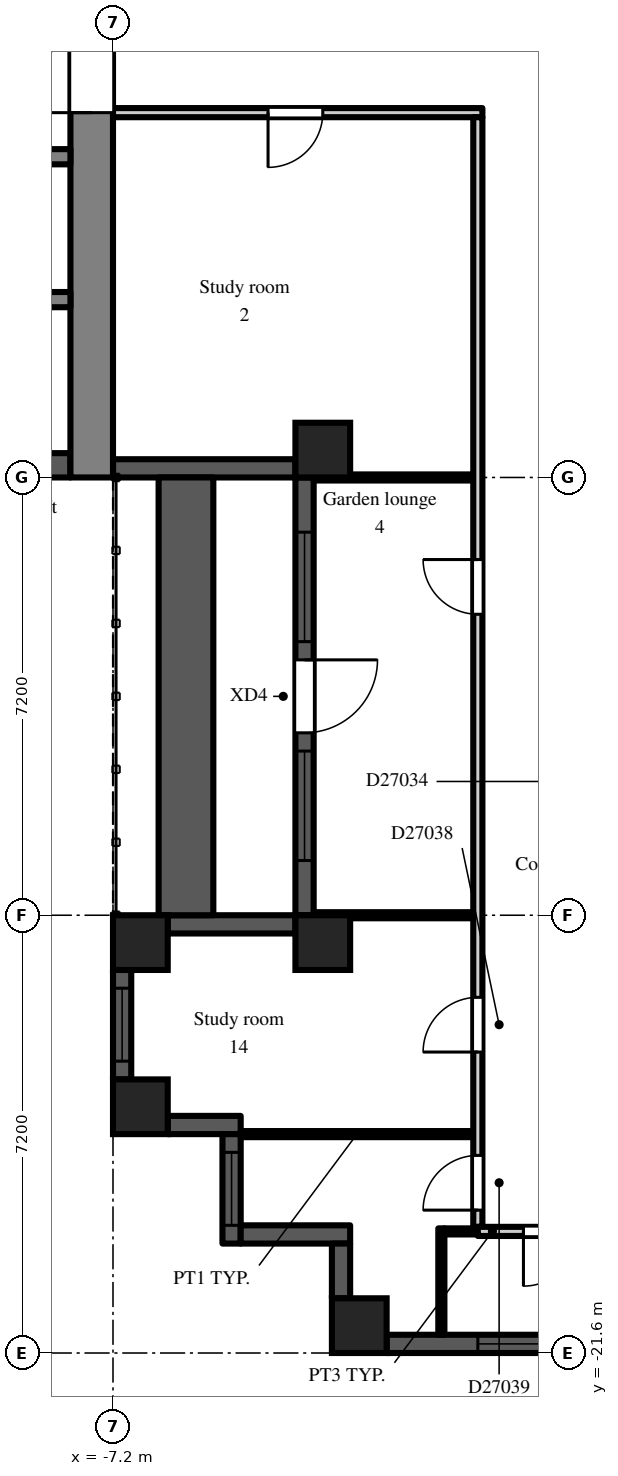
"""IFC4 building model, lengths in metres.
Left out: names, types, materials, properties, quantities, classifications, styles, units other than length and angle.
Written with IfcOpenShell. Run it as: python <this file> out.ifc"""

import sys

from ifc_helpers import new_model, si_unit, direction, frame, frame_2d, origin, origin_2d, place, context, subcontext, project, spatial, rectangle, extrude, element, fill, save


model = new_model("IFC4")
c1 = context("Model", 3, precision=1e-05, world=origin(), true_north=direction((0.0, 1.0)))
c2 = subcontext(c1, "Body", "Model", "MODEL_VIEW")
j1 = project(units=[si_unit("LENGTHUNIT", "METRE"), si_unit("PLANEANGLEUNIT", "RADIAN")], contexts=[c1])
p1 = place(None, origin())
s1 = spatial("IfcSite", under=j1, at=p1, CompositionType="ELEMENT")
p2 = place(p1, origin())
s2 = spatial("IfcBuilding", under=s1, at=p2, CompositionType="ELEMENT")
p3 = place(p2, frame((0.0, 0.0, 191.7)))
s3 = spatial("IfcBuildingStorey", under=s2, at=p3, CompositionType="ELEMENT", Elevation=191.7)
for number, where, z_axis, x_axis in (
    (1, (-6.75, -17.55, 0.0), (0.0, 0.0, 1.0), (1.0, 0.0, 0.0)),
    (2, (-6.75, -14.85, 0.0), (0.0, 0.0, 1.0), (1.0, 0.0, 0.0)),
    (3, (-3.75, -14.85, 0.0), (0.0, 0.0, 1.0), (1.0, 0.0, 0.0)),
    (4, (-3.75, -6.75, 0.0), (0.0, 0.0, 1.0), (1.0, 0.0, 0.0)),
    (5, (-3.15, -21.15, 0.0), (0.0, 0.0, 1.0), (1.0, 0.0, 0.0)),
):
    element("IfcColumn", number, at=place(p3, frame(where, z_axis=z_axis, x_axis=x_axis)), inside=s3, PredefinedType="COLUMN", context=c2, shape_type="SweptSolid", body=[
        extrude(rectangle(XDim=0.9, YDim=0.9, at=origin_2d()), origin(), (0.0, 0.0, 1.0), 3.0),
    ])
p4 = place(p3, frame((-7.2, -7.05, 0.0), z_axis=(0.0, 0.0, 1.0), x_axis=(1.0, 0.0, 0.0)))
e6 = element("IfcWall", 6, at=p4, inside=s3, PredefinedType="SOLIDWALL", context=c2, shape_type="SweptSolid", body=[
    extrude(rectangle(XDim=3.0, YDim=0.3, at=frame_2d((1.5, 0.0))), origin(), (0.0, 0.0, 1.0), 2.55),
])
p5 = place(p3, frame((-4.05, -7.2, 0.0), z_axis=(0.0, 0.0, 1.0), x_axis=(0.0, -1.0, 0.0)))
e7 = element("IfcWall", 7, at=p5, inside=s3, PredefinedType="SOLIDWALL", context=c2, shape_type="SweptSolid", body=[
    extrude(rectangle(XDim=7.2, YDim=0.3, at=frame_2d((3.6, 0.0))), origin(), (0.0, 0.0, 1.0), 2.55),
])
p6 = place(p5, frame((3.0, 0.0, 0.0)))
e8 = element("IfcOpeningElement", 8, at=p6, cuts=e7, PredefinedType="OPENING", context=c2, shape_type="SweptSolid", body=[
    extrude(rectangle(XDim=1.2, YDim=2.05, at=frame_2d((0.6, 1.025))), frame((0.0, 0.16, 0.0), z_axis=(0.0, -1.0, 0.0), x_axis=(1.0, 0.0, 0.0)), (0.0, 0.0, 1.0), 0.32),
])
p7 = place(p5, frame((0.9, 0.0, 0.2)))
e9 = element("IfcOpeningElement", 9, at=p7, cuts=e7, PredefinedType="OPENING", context=c2, shape_type="SweptSolid", body=[
    extrude(rectangle(XDim=1.8, YDim=1.85, at=frame_2d((0.9, 0.925))), frame((0.0, 0.16, 0.0), z_axis=(0.0, -1.0, 0.0), x_axis=(1.0, 0.0, 0.0)), (0.0, 0.0, 1.0), 0.32),
])
p8 = place(p5, frame((4.5, 0.0, 0.2)))
e10 = element("IfcOpeningElement", 10, at=p8, cuts=e7, PredefinedType="OPENING", context=c2, shape_type="SweptSolid", body=[
    extrude(rectangle(XDim=1.8, YDim=1.85, at=frame_2d((0.9, 0.925))), frame((0.0, 0.16, 0.0), z_axis=(0.0, -1.0, 0.0), x_axis=(1.0, 0.0, 0.0)), (0.0, 0.0, 1.0), 0.32),
])
p9 = place(p3, frame((-4.2, -14.55, 0.0), z_axis=(0.0, 0.0, 1.0), x_axis=(-1.0, 0.0, 0.0)))
e11 = element("IfcWall", 11, at=p9, inside=s3, PredefinedType="SOLIDWALL", context=c2, shape_type="SweptSolid", body=[
    extrude(rectangle(XDim=2.1, YDim=0.3, at=frame_2d((1.05, 0.0))), origin(), (0.0, 0.0, 1.0), 2.55),
])
p10 = place(p3, frame((-7.05, -15.3, 0.0), z_axis=(0.0, 0.0, 1.0), x_axis=(0.0, -1.0, 0.0)))
e12 = element("IfcWall", 12, at=p10, inside=s3, PredefinedType="SOLIDWALL", context=c2, shape_type="SweptSolid", body=[
    extrude(rectangle(XDim=1.8, YDim=0.3, at=frame_2d((0.9, 0.0))), origin(), (0.0, 0.0, 1.0), 2.3),
])
p11 = place(p10, frame((0.3, 0.0, 0.2)))
e13 = element("IfcOpeningElement", 13, at=p11, cuts=e12, PredefinedType="OPENING", context=c2, shape_type="SweptSolid", body=[
    extrude(rectangle(XDim=1.2, YDim=1.85, at=frame_2d((0.6, 0.925))), frame((0.0, 0.16, 0.0), z_axis=(0.0, -1.0, 0.0), x_axis=(1.0, 0.0, 0.0)), (0.0, 0.0, 1.0), 0.32),
])
p12 = place(p3, frame((-6.3, -17.85, 0.0), z_axis=(0.0, 0.0, 1.0), x_axis=(1.0, 0.0, 0.0)))
e14 = element("IfcWall", 14, at=p12, inside=s3, PredefinedType="SOLIDWALL", context=c2, shape_type="SweptSolid", body=[
    extrude(rectangle(XDim=1.2, YDim=0.3, at=frame_2d((0.6, 0.0))), origin(), (0.0, 0.0, 1.0), 2.55),
])
p13 = place(p3, frame((-5.25, -18.0, 0.0), z_axis=(0.0, 0.0, 1.0), x_axis=(0.0, -1.0, 0.0)))
e15 = element("IfcWall", 15, at=p13, inside=s3, PredefinedType="SOLIDWALL", context=c2, shape_type="SweptSolid", body=[
    extrude(rectangle(XDim=1.8, YDim=0.3, at=frame_2d((0.9, 0.0))), origin(), (0.0, 0.0, 1.0), 2.55),
])
p14 = place(p13, frame((0.3, 0.0, 0.2)))
e16 = element("IfcOpeningElement", 16, at=p14, cuts=e15, PredefinedType="OPENING", context=c2, shape_type="SweptSolid", body=[
    extrude(rectangle(XDim=1.2, YDim=1.85, at=frame_2d((0.6, 0.925))), frame((0.0, 0.16, 0.0), z_axis=(0.0, -1.0, 0.0), x_axis=(1.0, 0.0, 0.0)), (0.0, 0.0, 1.0), 0.32),
])
p15 = place(p3, frame((-5.1, -19.65, 0.0), z_axis=(0.0, 0.0, 1.0), x_axis=(1.0, 0.0, 0.0)))
e17 = element("IfcWall", 17, at=p15, inside=s3, PredefinedType="SOLIDWALL", context=c2, shape_type="SweptSolid", body=[
    extrude(rectangle(XDim=1.8, YDim=0.3, at=frame_2d((0.9, 0.0))), origin(), (0.0, 0.0, 1.0), 2.55),
])
p16 = place(p3, frame((-3.45, -19.8, 0.0), z_axis=(0.0, 0.0, 1.0), x_axis=(0.0, -1.0, 0.0)))
e18 = element("IfcWall", 18, at=p16, inside=s3, PredefinedType="SOLIDWALL", context=c2, shape_type="SweptSolid", body=[
    extrude(rectangle(XDim=0.9, YDim=0.3, at=frame_2d((0.45, 0.0))), origin(), (0.0, 0.0, 1.0), 2.55),
])
p17 = place(p3, frame((-2.7, -21.45, 0.0), z_axis=(0.0, 0.0, 1.0), x_axis=(1.0, 0.0, 0.0)))
e19 = element("IfcWall", 19, at=p17, inside=s3, PredefinedType="SOLIDWALL", context=c2, shape_type="SweptSolid", body=[
    extrude(rectangle(XDim=5.4, YDim=0.3, at=frame_2d((2.7, 0.0))), origin(), (0.0, 0.0, 1.0), 2.3),
])
p18 = place(p17, frame((1.5, 0.0, 0.2)))
e20 = element("IfcOpeningElement", 20, at=p18, cuts=e19, PredefinedType="OPENING", context=c2, shape_type="SweptSolid", body=[
    extrude(rectangle(XDim=2.4, YDim=1.85, at=frame_2d((1.2, 0.925))), frame((0.0, 0.16, 0.0), z_axis=(0.0, -1.0, 0.0), x_axis=(1.0, 0.0, 0.0)), (0.0, 0.0, 1.0), 0.32),
])
p19 = place(p3, frame((-6.0, -14.4, 0.0), z_axis=(0.0, 0.0, 1.0), x_axis=(0.0, 1.0, 0.0)))
e21 = element("IfcWall", 21, at=p19, inside=s3, PredefinedType="PARAPET", context=c2, shape_type="SweptSolid", body=[
    extrude(rectangle(XDim=7.2, YDim=0.9, at=frame_2d((3.6, 0.0))), origin(), (0.0, 0.0, 1.0), 0.8),
])
p20 = place(p3, frame((-7.55, -7.2, 0.0), z_axis=(0.0, 0.0, 1.0), x_axis=(0.0, 1.0, 0.0)))
e22 = element("IfcWall", 22, at=p20, inside=s3, PredefinedType="SHEAR", context=c2, shape_type="SweptSolid", body=[
    extrude(rectangle(XDim=14.4, YDim=0.7, at=frame_2d((7.2, 0.0))), origin(), (0.0, 0.0, 1.0), 2.55),
])
p21 = place(p20, frame((6.0, 0.0, 0.0)))
e23 = element("IfcOpeningElement", 23, at=p21, cuts=e22, PredefinedType="OPENING", context=c2, shape_type="SweptSolid", body=[
    extrude(rectangle(XDim=2.4, YDim=2.2, at=frame_2d((1.2, 1.1))), frame((0.0, 0.36, 0.0), z_axis=(0.0, -1.0, 0.0), x_axis=(1.0, 0.0, 0.0)), (0.0, 0.0, 1.0), 0.72),
])
p22 = place(p3, frame((-7.9, -7.0, 0.0), z_axis=(0.0, 0.0, 1.0), x_axis=(-1.0, 0.0, 0.0)))
e24 = element("IfcWall", 24, at=p22, inside=s3, PredefinedType="SHEAR", context=c2, shape_type="SweptSolid", body=[
    extrude(rectangle(XDim=12.95, YDim=0.4, at=frame_2d((6.475, 0.0))), origin(), (0.0, 0.0, 1.0), 2.55),
])
p23 = place(p3, frame((-7.9, -1.925, 0.0), z_axis=(0.0, 0.0, 1.0), x_axis=(-1.0, 0.0, 0.0)))
e25 = element("IfcWall", 25, at=p23, inside=s3, PredefinedType="SHEAR", context=c2, shape_type="SweptSolid", body=[
    extrude(rectangle(XDim=12.95, YDim=0.25, at=frame_2d((6.475, 0.0))), origin(), (0.0, 0.0, 1.0), 2.55),
])
p24 = place(p23, frame((0.525, 0.0, 0.0)))
e26 = element("IfcOpeningElement", 26, at=p24, cuts=e25, PredefinedType="OPENING", context=c2, shape_type="SweptSolid", body=[
    extrude(rectangle(XDim=0.9, YDim=2.1, at=frame_2d((0.45, 1.05))), frame((0.0, 0.135, 0.0), z_axis=(0.0, -1.0, 0.0), x_axis=(1.0, 0.0, 0.0)), (0.0, 0.0, 1.0), 0.27),
])
p25 = place(p23, frame((2.625, 0.0, 0.0)))
e27 = element("IfcOpeningElement", 27, at=p25, cuts=e25, PredefinedType="OPENING", context=c2, shape_type="SweptSolid", body=[
    extrude(rectangle(XDim=1.1, YDim=2.1, at=frame_2d((0.55, 1.05))), frame((0.0, 0.135, 0.0), z_axis=(0.0, -1.0, 0.0), x_axis=(1.0, 0.0, 0.0)), (0.0, 0.0, 1.0), 0.27),
])
p26 = place(p23, frame((8.225, 0.0, 0.0)))
e28 = element("IfcOpeningElement", 28, at=p26, cuts=e25, PredefinedType="OPENING", context=c2, shape_type="SweptSolid", body=[
    extrude(rectangle(XDim=0.9, YDim=2.1, at=frame_2d((0.45, 1.05))), frame((0.0, 0.135, 0.0), z_axis=(0.0, -1.0, 0.0), x_axis=(1.0, 0.0, 0.0)), (0.0, 0.0, 1.0), 0.27),
])
p27 = place(p3, frame((-7.9, -4.275, 0.0), z_axis=(0.0, 0.0, 1.0), x_axis=(-1.0, 0.0, 0.0)))
e29 = element("IfcWall", 29, at=p27, inside=s3, PredefinedType="SHEAR", context=c2, shape_type="SweptSolid", body=[
    extrude(rectangle(XDim=1.95, YDim=0.25, at=frame_2d((0.975, 0.0))), origin(), (0.0, 0.0, 1.0), 2.55),
])
p28 = place(p3, frame((-7.2, -1.2, 0.0), z_axis=(0.0, 0.0, 1.0), x_axis=(1.0, 0.0, 0.0)))
e30 = element("IfcWall", 30, at=p28, inside=s3, PredefinedType="PARTITIONING", context=c2, shape_type="SweptSolid", body=[
    extrude(rectangle(XDim=6.075, YDim=0.15, at=frame_2d((3.038, 0.0))), origin(), (0.0, 0.0, 1.0), 2.55),
])
p29 = place(p28, frame((2.55, 0.0, 0.0)))
e31 = element("IfcOpeningElement", 31, at=p29, cuts=e30, PredefinedType="OPENING", context=c2, shape_type="SweptSolid", body=[
    extrude(rectangle(XDim=0.9, YDim=2.1, at=frame_2d((0.45, 1.05))), frame((0.0, 0.085, 0.0), z_axis=(0.0, -1.0, 0.0), x_axis=(1.0, 0.0, 0.0)), (0.0, 0.0, 1.0), 0.17),
])
p30 = place(p3, frame((-5.1, -18.0, 0.0), z_axis=(0.0, 0.0, 1.0), x_axis=(1.0, 0.0, 0.0)))
e32 = element("IfcWall", 32, at=p30, inside=s3, PredefinedType="PARTITIONING", context=c2, shape_type="SweptSolid", body=[
    extrude(rectangle(XDim=3.825, YDim=0.1, at=frame_2d((1.913, 0.0))), origin(), (0.0, 0.0, 1.0), 2.55),
])
for number, where, z_axis, x_axis in (
    (33, (-3.9, -14.4, 0.0), (0.0, 0.0, 1.0), (1.0, 0.0, 0.0)),
    (34, (-3.9, -7.2, 0.0), (0.0, 0.0, 1.0), (1.0, 0.0, 0.0)),
):
    element("IfcWall", number, at=place(p3, frame(where, z_axis=z_axis, x_axis=x_axis)), inside=s3, PredefinedType="PARTITIONING", context=c2, shape_type="SweptSolid", body=[
        extrude(rectangle(XDim=2.625, YDim=0.1, at=frame_2d((1.312, 0.0))), origin(), (0.0, 0.0, 1.0), 2.55),
    ])
p31 = place(p3, frame((-1.8, -21.3, 0.0), z_axis=(0.0, 0.0, 1.0), x_axis=(0.0, 1.0, 0.0)))
e35 = element("IfcWall", 35, at=p31, inside=s3, PredefinedType="PARTITIONING", context=c2, shape_type="SweptSolid", body=[
    extrude(rectangle(XDim=1.75, YDim=0.1, at=frame_2d((0.875, 0.0))), origin(), (0.0, 0.0, 1.0), 2.55),
])
p32 = place(p3, frame((-1.75, -19.6, 0.0), z_axis=(0.0, 0.0, 1.0), x_axis=(1.0, 0.0, 0.0)))
e36 = element("IfcWall", 36, at=p32, inside=s3, PredefinedType="PARTITIONING", context=c2, shape_type="SweptSolid", body=[
    extrude(rectangle(XDim=0.55, YDim=0.1, at=frame_2d((0.275, 0.0))), origin(), (0.0, 0.0, 1.0), 2.55),
])
p33 = place(p3, frame((-1.2, -19.525, 0.0), z_axis=(0.0, 0.0, 1.0), x_axis=(0.0, 1.0, 0.0)))
e37 = element("IfcWall", 37, at=p33, inside=s3, PredefinedType="PARTITIONING", context=c2, shape_type="SweptSolid", body=[
    extrude(rectangle(XDim=18.25, YDim=0.15, at=frame_2d((9.125, 0.0))), origin(), (0.0, 0.0, 1.0), 2.55),
])
p34 = place(p33, frame((10.075, 0.0, 0.0)))
e38 = element("IfcOpeningElement", 38, at=p34, cuts=e37, PredefinedType="OPENING", context=c2, shape_type="SweptSolid", body=[
    extrude(rectangle(XDim=0.9, YDim=2.1, at=frame_2d((0.45, 1.05))), frame((0.0, 0.085, 0.0), z_axis=(0.0, -1.0, 0.0), x_axis=(1.0, 0.0, 0.0)), (0.0, 0.0, 1.0), 0.17),
])
p35 = place(p33, frame((2.875, 0.0, 0.0)))
e39 = element("IfcOpeningElement", 39, at=p35, cuts=e37, PredefinedType="OPENING", context=c2, shape_type="SweptSolid", body=[
    extrude(rectangle(XDim=0.9, YDim=2.1, at=frame_2d((0.45, 1.05))), frame((0.0, 0.085, 0.0), z_axis=(0.0, -1.0, 0.0), x_axis=(1.0, 0.0, 0.0)), (0.0, 0.0, 1.0), 0.17),
])
p36 = place(p33, frame((0.275, 0.0, 0.0)))
e40 = element("IfcOpeningElement", 40, at=p36, cuts=e37, PredefinedType="OPENING", context=c2, shape_type="SweptSolid", body=[
    extrude(rectangle(XDim=0.9, YDim=2.1, at=frame_2d((0.45, 1.05))), frame((0.0, 0.085, 0.0), z_axis=(0.0, -1.0, 0.0), x_axis=(1.0, 0.0, 0.0)), (0.0, 0.0, 1.0), 0.17),
])
p37 = place(p3, frame((-1.2, -19.6, 0.0), z_axis=(0.0, 0.0, 1.0), x_axis=(1.0, 0.0, 0.0)))
e41 = element("IfcWall", 41, at=p37, inside=s3, PredefinedType="PARTITIONING", context=c2, shape_type="SweptSolid", body=[
    extrude(rectangle(XDim=2.4, YDim=0.15, at=frame_2d((1.2, 0.0))), origin(), (0.0, 0.0, 1.0), 2.55),
])
p38 = place(p37, frame((0.75, 0.0, 0.0)))
e42 = element("IfcOpeningElement", 42, at=p38, cuts=e41, PredefinedType="OPENING", context=c2, shape_type="SweptSolid", body=[
    extrude(rectangle(XDim=0.9, YDim=2.1, at=frame_2d((0.45, 1.05))), frame((0.0, 0.085, 0.0), z_axis=(0.0, -1.0, 0.0), x_axis=(1.0, 0.0, 0.0)), (0.0, 0.0, 1.0), 0.17),
])
p39 = place(p6, origin())
e43 = element("IfcDoor", 43, at=p39, inside=s3, OperationType="SINGLE_SWING_LEFT", PredefinedType="DOOR", context=c2, shape_type="SweptSolid", body=[
    extrude(rectangle(XDim=1.2, YDim=2.05, at=frame_2d((0.6, 1.025))), frame((0.0, 0.025, 0.0), z_axis=(0.0, -1.0, 0.0), x_axis=(1.0, 0.0, 0.0)), (0.0, 0.0, 1.0), 0.05),
])
fill(e8, e43)
p40 = place(p7, origin())
e44 = element("IfcWindow", 44, at=p40, inside=s3, PartitioningType="SINGLE_PANEL", PredefinedType="WINDOW", context=c2, shape_type="SweptSolid", body=[
    extrude(rectangle(XDim=1.8, YDim=1.85, at=frame_2d((0.9, 0.925))), frame((0.0, 0.03, 0.0), z_axis=(0.0, -1.0, 0.0), x_axis=(1.0, 0.0, 0.0)), (0.0, 0.0, 1.0), 0.06),
])
fill(e9, e44)
p41 = place(p8, origin())
e45 = element("IfcWindow", 45, at=p41, inside=s3, PartitioningType="SINGLE_PANEL", PredefinedType="WINDOW", context=c2, shape_type="SweptSolid", body=[
    extrude(rectangle(XDim=1.8, YDim=1.85, at=frame_2d((0.9, 0.925))), frame((0.0, 0.03, 0.0), z_axis=(0.0, -1.0, 0.0), x_axis=(1.0, 0.0, 0.0)), (0.0, 0.0, 1.0), 0.06),
])
fill(e10, e45)
p42 = place(p11, origin())
e46 = element("IfcWindow", 46, at=p42, inside=s3, PartitioningType="SINGLE_PANEL", PredefinedType="WINDOW", context=c2, shape_type="SweptSolid", body=[
    extrude(rectangle(XDim=1.2, YDim=1.85, at=frame_2d((0.6, 0.925))), frame((0.0, 0.03, 0.0), z_axis=(0.0, -1.0, 0.0), x_axis=(1.0, 0.0, 0.0)), (0.0, 0.0, 1.0), 0.06),
])
fill(e13, e46)
p43 = place(p14, origin())
e47 = element("IfcWindow", 47, at=p43, inside=s3, PartitioningType="SINGLE_PANEL", PredefinedType="WINDOW", context=c2, shape_type="SweptSolid", body=[
    extrude(rectangle(XDim=1.2, YDim=1.85, at=frame_2d((0.6, 0.925))), frame((0.0, 0.03, 0.0), z_axis=(0.0, -1.0, 0.0), x_axis=(1.0, 0.0, 0.0)), (0.0, 0.0, 1.0), 0.06),
])
fill(e16, e47)
p44 = place(p18, origin())
e48 = element("IfcWindow", 48, at=p44, inside=s3, PartitioningType="SINGLE_PANEL", PredefinedType="WINDOW", context=c2, shape_type="SweptSolid", body=[
    extrude(rectangle(XDim=2.4, YDim=1.85, at=frame_2d((1.2, 0.925))), frame((0.0, 0.03, 0.0), z_axis=(0.0, -1.0, 0.0), x_axis=(1.0, 0.0, 0.0)), (0.0, 0.0, 1.0), 0.06),
])
fill(e20, e48)
p45 = place(p21, origin())
e49 = element("IfcDoor", 49, at=p45, inside=s3, OperationType="DOUBLE_DOOR_DOUBLE_SWING", PredefinedType="DOOR", context=c2, shape_type="SweptSolid", body=[
    extrude(rectangle(XDim=2.4, YDim=2.2, at=frame_2d((1.2, 1.1))), frame((0.0, 0.025, 0.0), z_axis=(0.0, -1.0, 0.0), x_axis=(1.0, 0.0, 0.0)), (0.0, 0.0, 1.0), 0.05),
])
fill(e23, e49)
p46 = place(p29, frame((0.9, 0.0, 0.0), z_axis=(0.0, 0.0, 1.0), x_axis=(-1.0, 0.0, 0.0)))
e50 = element("IfcDoor", 50, at=p46, inside=s3, OperationType="SINGLE_SWING_RIGHT", PredefinedType="DOOR", context=c2, shape_type="SweptSolid", body=[
    extrude(rectangle(XDim=0.9, YDim=2.1, at=frame_2d((0.45, 1.05))), frame((0.0, 0.025, 0.0), z_axis=(0.0, -1.0, 0.0), x_axis=(1.0, 0.0, 0.0)), (0.0, 0.0, 1.0), 0.05),
])
fill(e31, e50)
p47 = place(p38, frame((0.9, 0.0, 0.0), z_axis=(0.0, 0.0, 1.0), x_axis=(-1.0, 0.0, 0.0)))
e51 = element("IfcDoor", 51, at=p47, inside=s3, OperationType="SINGLE_SWING_RIGHT", PredefinedType="DOOR", context=c2, shape_type="SweptSolid", body=[
    extrude(rectangle(XDim=0.9, YDim=2.1, at=frame_2d((0.45, 1.05))), frame((0.0, 0.025, 0.0), z_axis=(0.0, -1.0, 0.0), x_axis=(1.0, 0.0, 0.0)), (0.0, 0.0, 1.0), 0.05),
])
fill(e42, e51)
p48 = place(p34, origin())
e52 = element("IfcDoor", 52, at=p48, inside=s3, OperationType="SINGLE_SWING_RIGHT", PredefinedType="DOOR", context=c2, shape_type="SweptSolid", body=[
    extrude(rectangle(XDim=0.9, YDim=2.1, at=frame_2d((0.45, 1.05))), frame((0.0, 0.025, 0.0), z_axis=(0.0, -1.0, 0.0), x_axis=(1.0, 0.0, 0.0)), (0.0, 0.0, 1.0), 0.05),
])
fill(e38, e52)
p49 = place(p35, origin())
e53 = element("IfcDoor", 53, at=p49, inside=s3, OperationType="SINGLE_SWING_LEFT", PredefinedType="DOOR", context=c2, shape_type="SweptSolid", body=[
    extrude(rectangle(XDim=0.9, YDim=2.1, at=frame_2d((0.45, 1.05))), frame((0.0, 0.025, 0.0), z_axis=(0.0, -1.0, 0.0), x_axis=(1.0, 0.0, 0.0)), (0.0, 0.0, 1.0), 0.05),
])
fill(e39, e53)
p50 = place(p36, origin())
e54 = element("IfcDoor", 54, at=p50, inside=s3, OperationType="SINGLE_SWING_LEFT", PredefinedType="DOOR", context=c2, shape_type="SweptSolid", body=[
    extrude(rectangle(XDim=0.9, YDim=2.1, at=frame_2d((0.45, 1.05))), frame((0.0, 0.025, 0.0), z_axis=(0.0, -1.0, 0.0), x_axis=(1.0, 0.0, 0.0)), (0.0, 0.0, 1.0), 0.05),
])
fill(e40, e54)
save(model, sys.argv[1])
